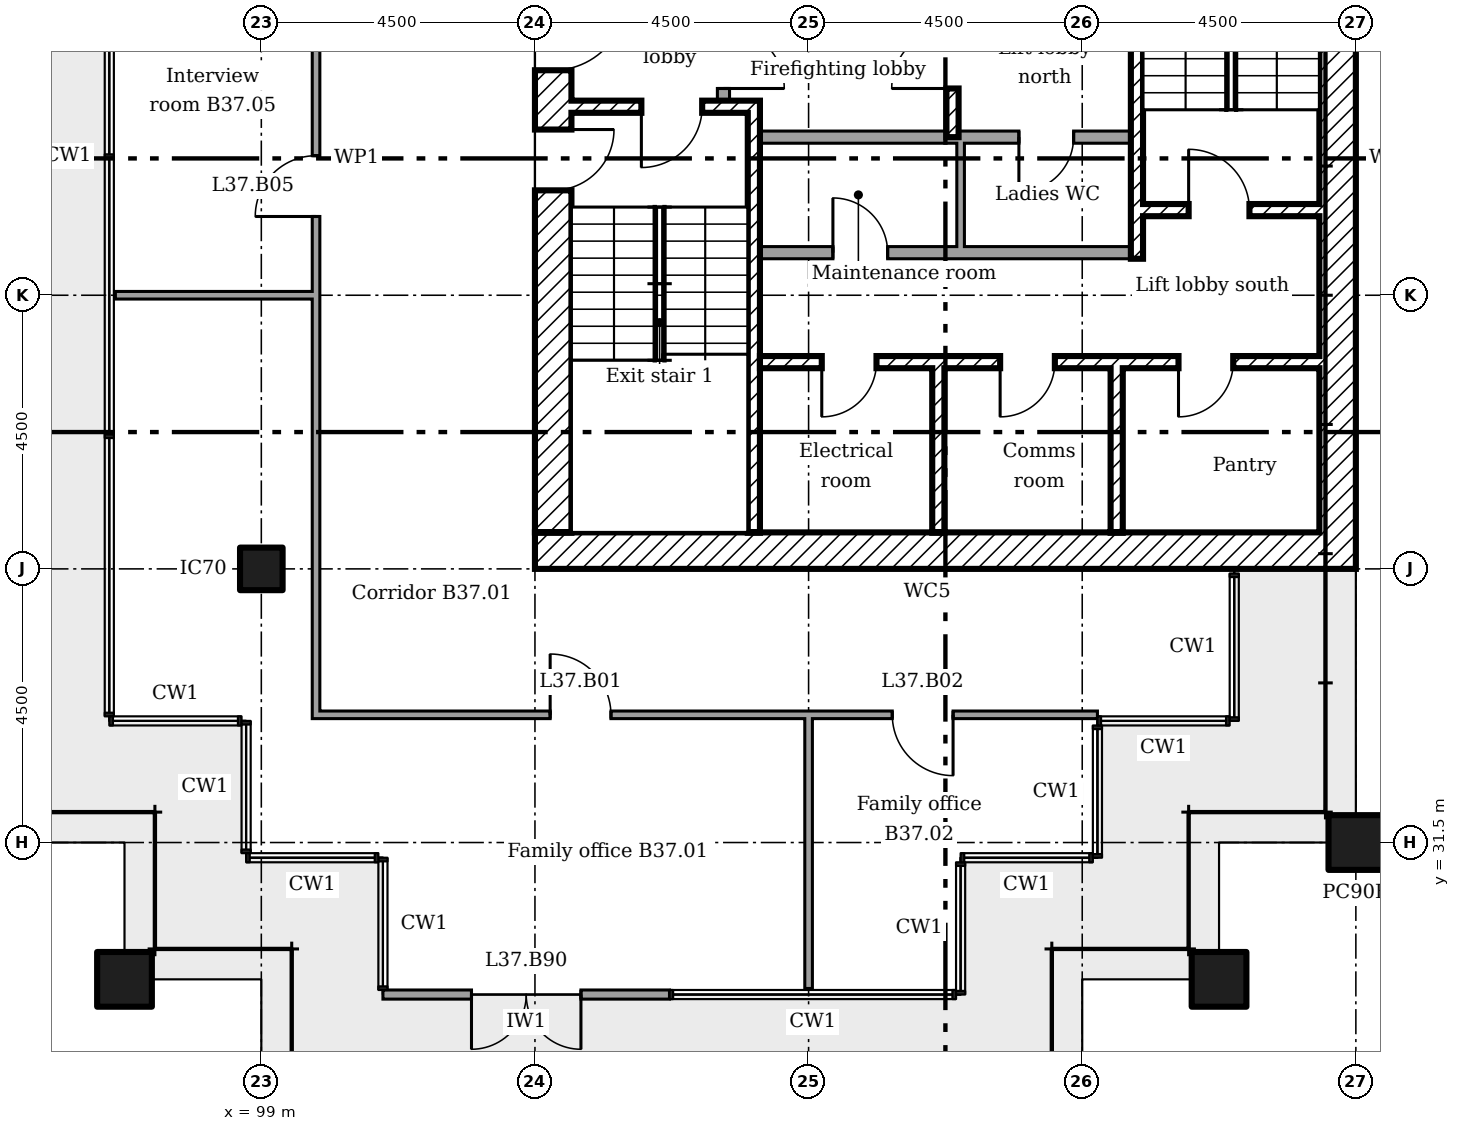
"""IFC4 building model, lengths in metres.
Left out: names, types, materials, properties, quantities, classifications, styles, units other than length and angle.
Written with IfcOpenShell. Run it as: python <this file> out.ifc"""

import sys

from ifc_helpers import new_model, si_unit, direction, frame, frame_2d, origin, origin_2d, place, context, subcontext, project, spatial, rectangle, extrude, element, fill, save


model = new_model("IFC4")
c1 = context("Model", 3, precision=1e-05, world=origin(), true_north=direction((0.0, 1.0)))
c2 = subcontext(c1, "Body", "Model", "MODEL_VIEW")
j1 = project(units=[si_unit("LENGTHUNIT", "METRE"), si_unit("PLANEANGLEUNIT", "RADIAN")], contexts=[c1])
p1 = place(None, origin())
s1 = spatial("IfcSite", under=j1, at=p1, CompositionType="ELEMENT")
p2 = place(p1, origin())
s2 = spatial("IfcBuilding", under=s1, at=p2, CompositionType="ELEMENT")
p3 = place(p2, frame((0.0, 0.0, 151.0)))
s3 = spatial("IfcBuildingStorey", under=s2, at=p3, CompositionType="ELEMENT", Elevation=151.0)
for number, where in (
    (1, (114.75, 29.25, 0.0)),
    (2, (117.0, 31.5, 0.0)),
    (3, (96.75, 29.25, 0.0)),
):
    element("IfcColumn", number, at=place(p3, frame(where)), inside=s3, PredefinedType="COLUMN", context=c2, shape_type="SweptSolid", body=[
        extrude(rectangle(XDim=0.9, YDim=0.9, at=origin_2d()), origin(), (0.0, 0.0, 1.0), 3.6),
    ])
p4 = place(p3, frame((99.0, 36.0, 0.0)))
e4 = element("IfcColumn", 4, at=p4, inside=s3, PredefinedType="COLUMN", context=c2, shape_type="SweptSolid", body=[
    extrude(rectangle(XDim=0.7, YDim=0.7, at=origin_2d()), origin(), (0.0, 0.0, 1.0), 3.6),
])
p5 = place(p3, frame((101.0, 29.0, 0.0)))
e5 = element("IfcWall", 5, at=p5, inside=s3, PredefinedType="SOLIDWALL", context=c2, shape_type="SweptSolid", body=[
    extrude(rectangle(XDim=4.712, YDim=0.15, at=frame_2d((2.356, 0.0))), origin(), (0.0, 0.0, 1.0), 3.45),
])
p6 = place(p5, frame((1.456, 0.0, 0.0)))
e6 = element("IfcOpeningElement", 6, at=p6, cuts=e5, PredefinedType="OPENING", context=c2, shape_type="SweptSolid", body=[
    extrude(rectangle(XDim=1.8, YDim=2.4, at=frame_2d((0.9, 1.2))), frame((0.0, 0.085, 0.0), z_axis=(0.0, -1.0, 0.0), x_axis=(1.0, 0.0, 0.0)), (0.0, 0.0, 1.0), 0.17),
])
p7 = place(p3, frame((116.7, 36.0, 0.0), z_axis=(0.0, 0.0, 1.0), x_axis=(0.0, 1.0, 0.0)))
e7 = element("IfcWall", 7, at=p7, inside=s3, PredefinedType="SHEAR", context=c2, shape_type="SweptSolid", body=[
    extrude(rectangle(XDim=13.5, YDim=0.6, at=frame_2d((6.75, 0.0))), origin(), (0.0, 0.0, 1.0), 3.35),
])
p8 = place(p3, frame((103.5, 36.3, 0.0)))
e8 = element("IfcWall", 8, at=p8, inside=s3, PredefinedType="SHEAR", context=c2, shape_type="SweptSolid", body=[
    extrude(rectangle(XDim=12.9, YDim=0.6, at=frame_2d((6.45, 0.0))), origin(), (0.0, 0.0, 1.0), 3.35),
])
p9 = place(p3, frame((103.8, 36.6, 0.0), z_axis=(0.0, 0.0, 1.0), x_axis=(0.0, 1.0, 0.0)))
e9 = element("IfcWall", 9, at=p9, inside=s3, PredefinedType="SHEAR", context=c2, shape_type="SweptSolid", body=[
    extrude(rectangle(XDim=12.3, YDim=0.6, at=frame_2d((6.15, 0.0))), origin(), (0.0, 0.0, 1.0), 3.35),
])
p10 = place(p9, frame((7.6, 0.0, 0.0)))
e10 = element("IfcOpeningElement", 10, at=p10, cuts=e9, PredefinedType="OPENING", context=c2, shape_type="SweptSolid", body=[
    extrude(rectangle(XDim=1.2, YDim=2.1, at=frame_2d((0.6, 1.05))), frame((0.0, 0.31, 0.0), z_axis=(0.0, -1.0, 0.0), x_axis=(1.0, 0.0, 0.0)), (0.0, 0.0, 1.0), 0.62),
])
p11 = place(p9, frame((5.625, 0.0, 0.0)))
e11 = element("IfcOpeningElement", 11, at=p11, cuts=e9, PredefinedType="OPENING", context=c2, shape_type="SweptSolid", body=[
    extrude(rectangle(XDim=1.0, YDim=2.1, at=frame_2d((0.5, 1.05))), frame((0.0, 0.31, 0.0), z_axis=(0.0, -1.0, 0.0), x_axis=(1.0, 0.0, 0.0)), (0.0, 0.0, 1.0), 0.62),
])
p12 = place(p3, frame((110.367, 48.9, 0.0), z_axis=(0.0, 0.0, 1.0), x_axis=(0.0, -1.0, 0.0)))
e12 = element("IfcWall", 12, at=p12, inside=s3, PredefinedType="SHEAR", context=c2, shape_type="SweptSolid", body=[
    extrude(rectangle(XDim=5.8, YDim=0.2, at=frame_2d((2.9, 0.0))), origin(), (0.0, 0.0, 1.0), 3.35),
])
p13 = place(p12, frame((4.0, 0.0, 0.0)))
e13 = element("IfcOpeningElement", 13, at=p13, cuts=e12, PredefinedType="OPENING", context=c2, shape_type="SweptSolid", body=[
    extrude(rectangle(XDim=1.0, YDim=2.1, at=frame_2d((0.5, 1.05))), frame((0.0, 0.11, 0.0), z_axis=(0.0, -1.0, 0.0), x_axis=(1.0, 0.0, 0.0)), (0.0, 0.0, 1.0), 0.22),
])
for number, where, z_axis, x_axis in (
    (14, (110.133, 36.6, 0.0), (0.0, 0.0, 1.0), (0.0, 1.0, 0.0)),
    (15, (113.067, 36.6, 0.0), (0.0, 0.0, 1.0), (0.0, 1.0, 0.0)),
):
    element("IfcWall", number, at=place(p3, frame(where, z_axis=z_axis, x_axis=x_axis)), inside=s3, PredefinedType="SHEAR", context=c2, shape_type="SweptSolid", body=[
        extrude(rectangle(XDim=2.7, YDim=0.2, at=frame_2d((1.35, 0.0))), origin(), (0.0, 0.0, 1.0), 3.35),
    ])
p14 = place(p3, frame((106.6, 43.7, 0.0), z_axis=(0.0, 0.0, 1.0), x_axis=(0.0, 1.0, 0.0)))
e16 = element("IfcWall", 16, at=p14, inside=s3, PredefinedType="PARTITIONING", context=c2, shape_type="SweptSolid", body=[
    extrude(rectangle(XDim=1.5, YDim=0.2, at=frame_2d((0.75, 0.0))), origin(), (0.0, 0.0, 1.0), 3.35),
])
p15 = place(p14, frame((0.2, 0.0, 0.0)))
e17 = element("IfcOpeningElement", 17, at=p15, cuts=e16, PredefinedType="OPENING", context=c2, shape_type="SweptSolid", body=[
    extrude(rectangle(XDim=1.0, YDim=2.1, at=frame_2d((0.5, 1.05))), frame((0.0, 0.11, 0.0), z_axis=(0.0, -1.0, 0.0), x_axis=(1.0, 0.0, 0.0)), (0.0, 0.0, 1.0), 0.22),
])
p16 = place(p3, frame((107.2, 39.4, 0.0)))
e18 = element("IfcWall", 18, at=p16, inside=s3, PredefinedType="SHEAR", context=c2, shape_type="SweptSolid", body=[
    extrude(rectangle(XDim=9.2, YDim=0.2, at=frame_2d((4.6, 0.0))), origin(), (0.0, 0.0, 1.0), 3.35),
])
p17 = place(p16, frame((1.017, 0.0, 0.0)))
e19 = element("IfcOpeningElement", 19, at=p17, cuts=e18, PredefinedType="OPENING", context=c2, shape_type="SweptSolid", body=[
    extrude(rectangle(XDim=0.9, YDim=2.1, at=frame_2d((0.45, 1.05))), frame((0.0, 0.11, 0.0), z_axis=(0.0, -1.0, 0.0), x_axis=(1.0, 0.0, 0.0)), (0.0, 0.0, 1.0), 0.22),
])
p18 = place(p16, frame((3.95, 0.0, 0.0)))
e20 = element("IfcOpeningElement", 20, at=p18, cuts=e18, PredefinedType="OPENING", context=c2, shape_type="SweptSolid", body=[
    extrude(rectangle(XDim=0.9, YDim=2.1, at=frame_2d((0.45, 1.05))), frame((0.0, 0.11, 0.0), z_axis=(0.0, -1.0, 0.0), x_axis=(1.0, 0.0, 0.0)), (0.0, 0.0, 1.0), 0.22),
])
p19 = place(p16, frame((6.883, 0.0, 0.0)))
e21 = element("IfcOpeningElement", 21, at=p19, cuts=e18, PredefinedType="OPENING", context=c2, shape_type="SweptSolid", body=[
    extrude(rectangle(XDim=0.9, YDim=2.1, at=frame_2d((0.45, 1.05))), frame((0.0, 0.11, 0.0), z_axis=(0.0, -1.0, 0.0), x_axis=(1.0, 0.0, 0.0)), (0.0, 0.0, 1.0), 0.22),
])
p20 = place(p3, frame((107.1, 36.6, 0.0), z_axis=(0.0, 0.0, 1.0), x_axis=(0.0, 1.0, 0.0)))
e22 = element("IfcWall", 22, at=p20, inside=s3, PredefinedType="SHEAR", context=c2, shape_type="SweptSolid", body=[
    extrude(rectangle(XDim=7.1, YDim=0.2, at=frame_2d((3.55, 0.0))), origin(), (0.0, 0.0, 1.0), 3.35),
])
p21 = place(p3, frame((104.1, 43.6, 0.0)))
e23 = element("IfcWall", 23, at=p21, inside=s3, PredefinedType="SHEAR", context=c2, shape_type="SweptSolid", body=[
    extrude(rectangle(XDim=2.9, YDim=0.2, at=frame_2d((1.45, 0.0))), origin(), (0.0, 0.0, 1.0), 3.35),
])
p22 = place(p21, frame((1.15, 0.0, 0.0)))
e24 = element("IfcOpeningElement", 24, at=p22, cuts=e23, PredefinedType="OPENING", context=c2, shape_type="SweptSolid", body=[
    extrude(rectangle(XDim=1.0, YDim=2.1, at=frame_2d((0.5, 1.05))), frame((0.0, 0.11, 0.0), z_axis=(0.0, -1.0, 0.0), x_axis=(1.0, 0.0, 0.0)), (0.0, 0.0, 1.0), 0.22),
])
p23 = place(p3, frame((113.5, 41.9, 0.0)))
e25 = element("IfcWall", 25, at=p23, inside=s3, PredefinedType="SHEAR", context=c2, shape_type="SweptSolid", body=[
    extrude(rectangle(XDim=2.9, YDim=0.2, at=frame_2d((1.45, 0.0))), origin(), (0.0, 0.0, 1.0), 3.35),
])
p24 = place(p23, frame((0.75, 0.0, 0.0)))
e26 = element("IfcOpeningElement", 26, at=p24, cuts=e25, PredefinedType="OPENING", context=c2, shape_type="SweptSolid", body=[
    extrude(rectangle(XDim=1.0, YDim=2.1, at=frame_2d((0.5, 1.05))), frame((0.0, 0.11, 0.0), z_axis=(0.0, -1.0, 0.0), x_axis=(1.0, 0.0, 0.0)), (0.0, 0.0, 1.0), 0.22),
])
p25 = place(p3, frame((113.4, 41.1, 0.0), z_axis=(0.0, 0.0, 1.0), x_axis=(0.0, 1.0, 0.0)))
e27 = element("IfcWall", 27, at=p25, inside=s3, PredefinedType="SHEAR", context=c2, shape_type="SweptSolid", body=[
    extrude(rectangle(XDim=7.8, YDim=0.2, at=frame_2d((3.9, 0.0))), origin(), (0.0, 0.0, 1.0), 3.35),
])
p26 = place(p3, frame((107.2, 43.1, 0.0)))
e28 = element("IfcWall", 28, at=p26, inside=s3, PredefinedType="PARTITIONING", context=c2, shape_type="SweptSolid", body=[
    extrude(rectangle(XDim=6.1, YDim=0.2, at=frame_2d((3.05, 0.0))), origin(), (0.0, 0.0, 1.0), 3.35),
])
p27 = place(p26, frame((4.259, 0.0, 0.0)))
e29 = element("IfcOpeningElement", 29, at=p27, cuts=e28, PredefinedType="OPENING", context=c2, shape_type="SweptSolid", body=[
    extrude(rectangle(XDim=0.9, YDim=2.1, at=frame_2d((0.45, 1.05))), frame((0.0, 0.11, 0.0), z_axis=(0.0, -1.0, 0.0), x_axis=(1.0, 0.0, 0.0)), (0.0, 0.0, 1.0), 0.22),
])
p28 = place(p3, frame((107.2, 41.2, 0.0)))
e30 = element("IfcWall", 30, at=p28, inside=s3, PredefinedType="PARTITIONING", context=c2, shape_type="SweptSolid", body=[
    extrude(rectangle(XDim=6.1, YDim=0.2, at=frame_2d((3.05, 0.0))), origin(), (0.0, 0.0, 1.0), 3.35),
])
p29 = place(p28, frame((1.2, 0.0, 0.0)))
e31 = element("IfcOpeningElement", 31, at=p29, cuts=e30, PredefinedType="OPENING", context=c2, shape_type="SweptSolid", body=[
    extrude(rectangle(XDim=0.9, YDim=2.1, at=frame_2d((0.45, 1.05))), frame((0.0, 0.11, 0.0), z_axis=(0.0, -1.0, 0.0), x_axis=(1.0, 0.0, 0.0)), (0.0, 0.0, 1.0), 0.22),
])
p30 = place(p3, frame((110.5, 41.3, 0.0), z_axis=(0.0, 0.0, 1.0), x_axis=(0.0, 1.0, 0.0)))
e32 = element("IfcWall", 32, at=p30, inside=s3, PredefinedType="PARTITIONING", context=c2, shape_type="SweptSolid", body=[
    extrude(rectangle(XDim=1.7, YDim=0.125, at=frame_2d((0.85, 0.0))), origin(), (0.0, 0.0, 1.0), 3.35),
])
p31 = place(p3, frame((99.837, 33.6, 0.0)))
e33 = element("IfcWall", 33, at=p31, inside=s3, PredefinedType="PARTITIONING", context=c2, shape_type="SweptSolid", body=[
    extrude(rectangle(XDim=12.913, YDim=0.125, at=frame_2d((6.456, 0.0))), origin(), (0.0, 0.0, 1.0), 3.45),
])
p32 = place(p31, frame((3.913, 0.0, 0.0)))
e34 = element("IfcOpeningElement", 34, at=p32, cuts=e33, PredefinedType="OPENING", context=c2, shape_type="SweptSolid", body=[
    extrude(rectangle(XDim=1.0, YDim=2.1, at=frame_2d((0.5, 1.05))), frame((0.0, 0.073, 0.0), z_axis=(0.0, -1.0, 0.0), x_axis=(1.0, 0.0, 0.0)), (0.0, 0.0, 1.0), 0.145),
])
p33 = place(p31, frame((9.539, 0.0, 0.0)))
e35 = element("IfcOpeningElement", 35, at=p33, cuts=e33, PredefinedType="OPENING", context=c2, shape_type="SweptSolid", body=[
    extrude(rectangle(XDim=1.0, YDim=2.1, at=frame_2d((0.5, 1.05))), frame((0.0, 0.073, 0.0), z_axis=(0.0, -1.0, 0.0), x_axis=(1.0, 0.0, 0.0)), (0.0, 0.0, 1.0), 0.145),
])
p34 = place(p3, frame((96.6, 40.5, 0.0)))
e36 = element("IfcWall", 36, at=p34, inside=s3, PredefinedType="PARTITIONING", context=c2, shape_type="SweptSolid", body=[
    extrude(rectangle(XDim=3.3, YDim=0.125, at=frame_2d((1.65, 0.0))), origin(), (0.0, 0.0, 1.0), 2.851),
])
p35 = place(p3, frame((99.9, 33.663, 0.0), z_axis=(0.0, 0.0, 1.0), x_axis=(0.0, 1.0, 0.0)))
e37 = element("IfcWall", 37, at=p35, inside=s3, PredefinedType="PARTITIONING", context=c2, shape_type="SweptSolid", body=[
    extrude(rectangle(XDim=18.175, YDim=0.125, at=frame_2d((9.087, 0.0))), origin(), (0.0, 0.0, 1.0), 3.45),
])
p36 = place(p35, frame((16.625, 0.0, 0.0)))
e38 = element("IfcOpeningElement", 38, at=p36, cuts=e37, PredefinedType="OPENING", context=c2, shape_type="SweptSolid", body=[
    extrude(rectangle(XDim=1.0, YDim=2.1, at=frame_2d((0.5, 1.05))), frame((0.0, 0.073, 0.0), z_axis=(0.0, -1.0, 0.0), x_axis=(1.0, 0.0, 0.0)), (0.0, 0.0, 1.0), 0.145),
])
p37 = place(p35, frame((13.087, 0.0, 0.0)))
e39 = element("IfcOpeningElement", 39, at=p37, cuts=e37, PredefinedType="OPENING", context=c2, shape_type="SweptSolid", body=[
    extrude(rectangle(XDim=1.0, YDim=2.1, at=frame_2d((0.5, 1.05))), frame((0.0, 0.073, 0.0), z_axis=(0.0, -1.0, 0.0), x_axis=(1.0, 0.0, 0.0)), (0.0, 0.0, 1.0), 0.145),
])
p38 = place(p35, frame((8.133, 0.0, 0.0)))
e40 = element("IfcOpeningElement", 40, at=p38, cuts=e37, PredefinedType="OPENING", context=c2, shape_type="SweptSolid", body=[
    extrude(rectangle(XDim=1.0, YDim=2.1, at=frame_2d((0.5, 1.05))), frame((0.0, 0.073, 0.0), z_axis=(0.0, -1.0, 0.0), x_axis=(1.0, 0.0, 0.0)), (0.0, 0.0, 1.0), 0.145),
])
p39 = place(p3, frame((108.0, 29.1, 0.0), z_axis=(0.0, 0.0, 1.0), x_axis=(0.0, 1.0, 0.0)))
e41 = element("IfcWall", 41, at=p39, inside=s3, PredefinedType="PARTITIONING", context=c2, shape_type="SweptSolid", body=[
    extrude(rectangle(XDim=4.5, YDim=0.125, at=frame_2d((2.25, 0.0))), origin(), (0.0, 0.0, 1.0), 2.851),
])
p40 = place(p6, frame((1.8, 0.0, 0.0), x_axis=(-1.0, 0.0, 0.0)))
e42 = element("IfcDoor", 42, at=p40, inside=s3, OperationType="DOUBLE_DOOR_DOUBLE_SWING", PredefinedType="NOTDEFINED", context=c2, shape_type="SweptSolid", body=[
    extrude(rectangle(XDim=1.8, YDim=2.4, at=frame_2d((0.9, 1.2))), frame((0.0, 0.025, 0.0), z_axis=(0.0, -1.0, 0.0), x_axis=(1.0, 0.0, 0.0)), (0.0, 0.0, 1.0), 0.05),
])
fill(e6, e42)
p41 = place(p10, frame((1.2, 0.0, 0.0), x_axis=(-1.0, 0.0, 0.0)))
e43 = element("IfcDoor", 43, at=p41, inside=s3, OperationType="SINGLE_SWING_RIGHT", PredefinedType="DOOR", context=c2, shape_type="SweptSolid", body=[
    extrude(rectangle(XDim=1.2, YDim=2.1, at=frame_2d((0.6, 1.05))), frame((0.0, 0.025, 0.0), z_axis=(0.0, -1.0, 0.0), x_axis=(1.0, 0.0, 0.0)), (0.0, 0.0, 1.0), 0.05),
])
fill(e10, e43)
p42 = place(p22, frame((1.0, 0.0, 0.0), x_axis=(-1.0, 0.0, 0.0)))
e44 = element("IfcDoor", 44, at=p42, inside=s3, OperationType="SINGLE_SWING_LEFT", PredefinedType="DOOR", context=c2, shape_type="SweptSolid", body=[
    extrude(rectangle(XDim=1.0, YDim=2.1, at=frame_2d((0.5, 1.05))), frame((0.0, 0.025, 0.0), z_axis=(0.0, -1.0, 0.0), x_axis=(1.0, 0.0, 0.0)), (0.0, 0.0, 1.0), 0.05),
])
fill(e24, e44)
p43 = place(p11, frame((1.0, 0.0, 0.0), x_axis=(-1.0, 0.0, 0.0)))
e45 = element("IfcDoor", 45, at=p43, inside=s3, OperationType="SINGLE_SWING_RIGHT", PredefinedType="DOOR", context=c2, shape_type="SweptSolid", body=[
    extrude(rectangle(XDim=1.0, YDim=2.1, at=frame_2d((0.5, 1.05))), frame((0.0, 0.025, 0.0), z_axis=(0.0, -1.0, 0.0), x_axis=(1.0, 0.0, 0.0)), (0.0, 0.0, 1.0), 0.05),
])
fill(e11, e45)
p44 = place(p24, origin())
e46 = element("IfcDoor", 46, at=p44, inside=s3, OperationType="SINGLE_SWING_RIGHT", PredefinedType="DOOR", context=c2, shape_type="SweptSolid", body=[
    extrude(rectangle(XDim=1.0, YDim=2.1, at=frame_2d((0.5, 1.05))), frame((0.0, 0.025, 0.0), z_axis=(0.0, -1.0, 0.0), x_axis=(1.0, 0.0, 0.0)), (0.0, 0.0, 1.0), 0.05),
])
fill(e26, e46)
p45 = place(p13, frame((1.0, 0.0, 0.0), x_axis=(-1.0, 0.0, 0.0)))
e47 = element("IfcDoor", 47, at=p45, inside=s3, OperationType="SINGLE_SWING_RIGHT", PredefinedType="DOOR", context=c2, shape_type="SweptSolid", body=[
    extrude(rectangle(XDim=1.0, YDim=2.1, at=frame_2d((0.5, 1.05))), frame((0.0, 0.025, 0.0), z_axis=(0.0, -1.0, 0.0), x_axis=(1.0, 0.0, 0.0)), (0.0, 0.0, 1.0), 0.05),
])
fill(e13, e47)
p46 = place(p15, frame((1.0, 0.0, 0.0), x_axis=(-1.0, 0.0, 0.0)))
e48 = element("IfcDoor", 48, at=p46, inside=s3, OperationType="SINGLE_SWING_LEFT", PredefinedType="DOOR", context=c2, shape_type="SweptSolid", body=[
    extrude(rectangle(XDim=1.0, YDim=2.1, at=frame_2d((0.5, 1.05))), frame((0.0, 0.025, 0.0), z_axis=(0.0, -1.0, 0.0), x_axis=(1.0, 0.0, 0.0)), (0.0, 0.0, 1.0), 0.05),
])
fill(e17, e48)
p47 = place(p17, frame((0.9, 0.0, 0.0), x_axis=(-1.0, 0.0, 0.0)))
e49 = element("IfcDoor", 49, at=p47, inside=s3, OperationType="SINGLE_SWING_LEFT", PredefinedType="DOOR", context=c2, shape_type="SweptSolid", body=[
    extrude(rectangle(XDim=0.9, YDim=2.1, at=frame_2d((0.45, 1.05))), frame((0.0, 0.025, 0.0), z_axis=(0.0, -1.0, 0.0), x_axis=(1.0, 0.0, 0.0)), (0.0, 0.0, 1.0), 0.05),
])
fill(e19, e49)
p48 = place(p18, frame((0.9, 0.0, 0.0), x_axis=(-1.0, 0.0, 0.0)))
e50 = element("IfcDoor", 50, at=p48, inside=s3, OperationType="SINGLE_SWING_LEFT", PredefinedType="DOOR", context=c2, shape_type="SweptSolid", body=[
    extrude(rectangle(XDim=0.9, YDim=2.1, at=frame_2d((0.45, 1.05))), frame((0.0, 0.025, 0.0), z_axis=(0.0, -1.0, 0.0), x_axis=(1.0, 0.0, 0.0)), (0.0, 0.0, 1.0), 0.05),
])
fill(e20, e50)
p49 = place(p19, frame((0.9, 0.0, 0.0), x_axis=(-1.0, 0.0, 0.0)))
e51 = element("IfcDoor", 51, at=p49, inside=s3, OperationType="SINGLE_SWING_LEFT", PredefinedType="DOOR", context=c2, shape_type="SweptSolid", body=[
    extrude(rectangle(XDim=0.9, YDim=2.1, at=frame_2d((0.45, 1.05))), frame((0.0, 0.025, 0.0), z_axis=(0.0, -1.0, 0.0), x_axis=(1.0, 0.0, 0.0)), (0.0, 0.0, 1.0), 0.05),
])
fill(e21, e51)
p50 = place(p29, origin())
e52 = element("IfcDoor", 52, at=p50, inside=s3, OperationType="SINGLE_SWING_RIGHT", PredefinedType="DOOR", context=c2, shape_type="SweptSolid", body=[
    extrude(rectangle(XDim=0.9, YDim=2.1, at=frame_2d((0.45, 1.05))), frame((0.0, 0.025, 0.0), z_axis=(0.0, -1.0, 0.0), x_axis=(1.0, 0.0, 0.0)), (0.0, 0.0, 1.0), 0.05),
])
fill(e31, e52)
p51 = place(p27, frame((0.9, 0.0, 0.0), x_axis=(-1.0, 0.0, 0.0)))
e53 = element("IfcDoor", 53, at=p51, inside=s3, OperationType="SINGLE_SWING_LEFT", PredefinedType="DOOR", context=c2, shape_type="SweptSolid", body=[
    extrude(rectangle(XDim=0.9, YDim=2.1, at=frame_2d((0.45, 1.05))), frame((0.0, 0.025, 0.0), z_axis=(0.0, -1.0, 0.0), x_axis=(1.0, 0.0, 0.0)), (0.0, 0.0, 1.0), 0.05),
])
fill(e29, e53)
p52 = place(p32, origin())
e54 = element("IfcDoor", 54, at=p52, inside=s3, OperationType="SINGLE_SWING_RIGHT", PredefinedType="DOOR", context=c2, shape_type="SweptSolid", body=[
    extrude(rectangle(XDim=1.0, YDim=2.1, at=frame_2d((0.5, 1.05))), frame((0.0, 0.025, 0.0), z_axis=(0.0, -1.0, 0.0), x_axis=(1.0, 0.0, 0.0)), (0.0, 0.0, 1.0), 0.05),
])
fill(e34, e54)
p53 = place(p33, frame((1.0, 0.0, 0.0), x_axis=(-1.0, 0.0, 0.0)))
e55 = element("IfcDoor", 55, at=p53, inside=s3, OperationType="SINGLE_SWING_RIGHT", PredefinedType="DOOR", context=c2, shape_type="SweptSolid", body=[
    extrude(rectangle(XDim=1.0, YDim=2.1, at=frame_2d((0.5, 1.05))), frame((0.0, 0.025, 0.0), z_axis=(0.0, -1.0, 0.0), x_axis=(1.0, 0.0, 0.0)), (0.0, 0.0, 1.0), 0.05),
])
fill(e35, e55)
p54 = place(p38, origin())
e56 = element("IfcDoor", 56, at=p54, inside=s3, OperationType="SINGLE_SWING_RIGHT", PredefinedType="DOOR", context=c2, shape_type="SweptSolid", body=[
    extrude(rectangle(XDim=1.0, YDim=2.1, at=frame_2d((0.5, 1.05))), frame((0.0, 0.025, 0.0), z_axis=(0.0, -1.0, 0.0), x_axis=(1.0, 0.0, 0.0)), (0.0, 0.0, 1.0), 0.05),
])
fill(e40, e56)
save(model, sys.argv[1])
